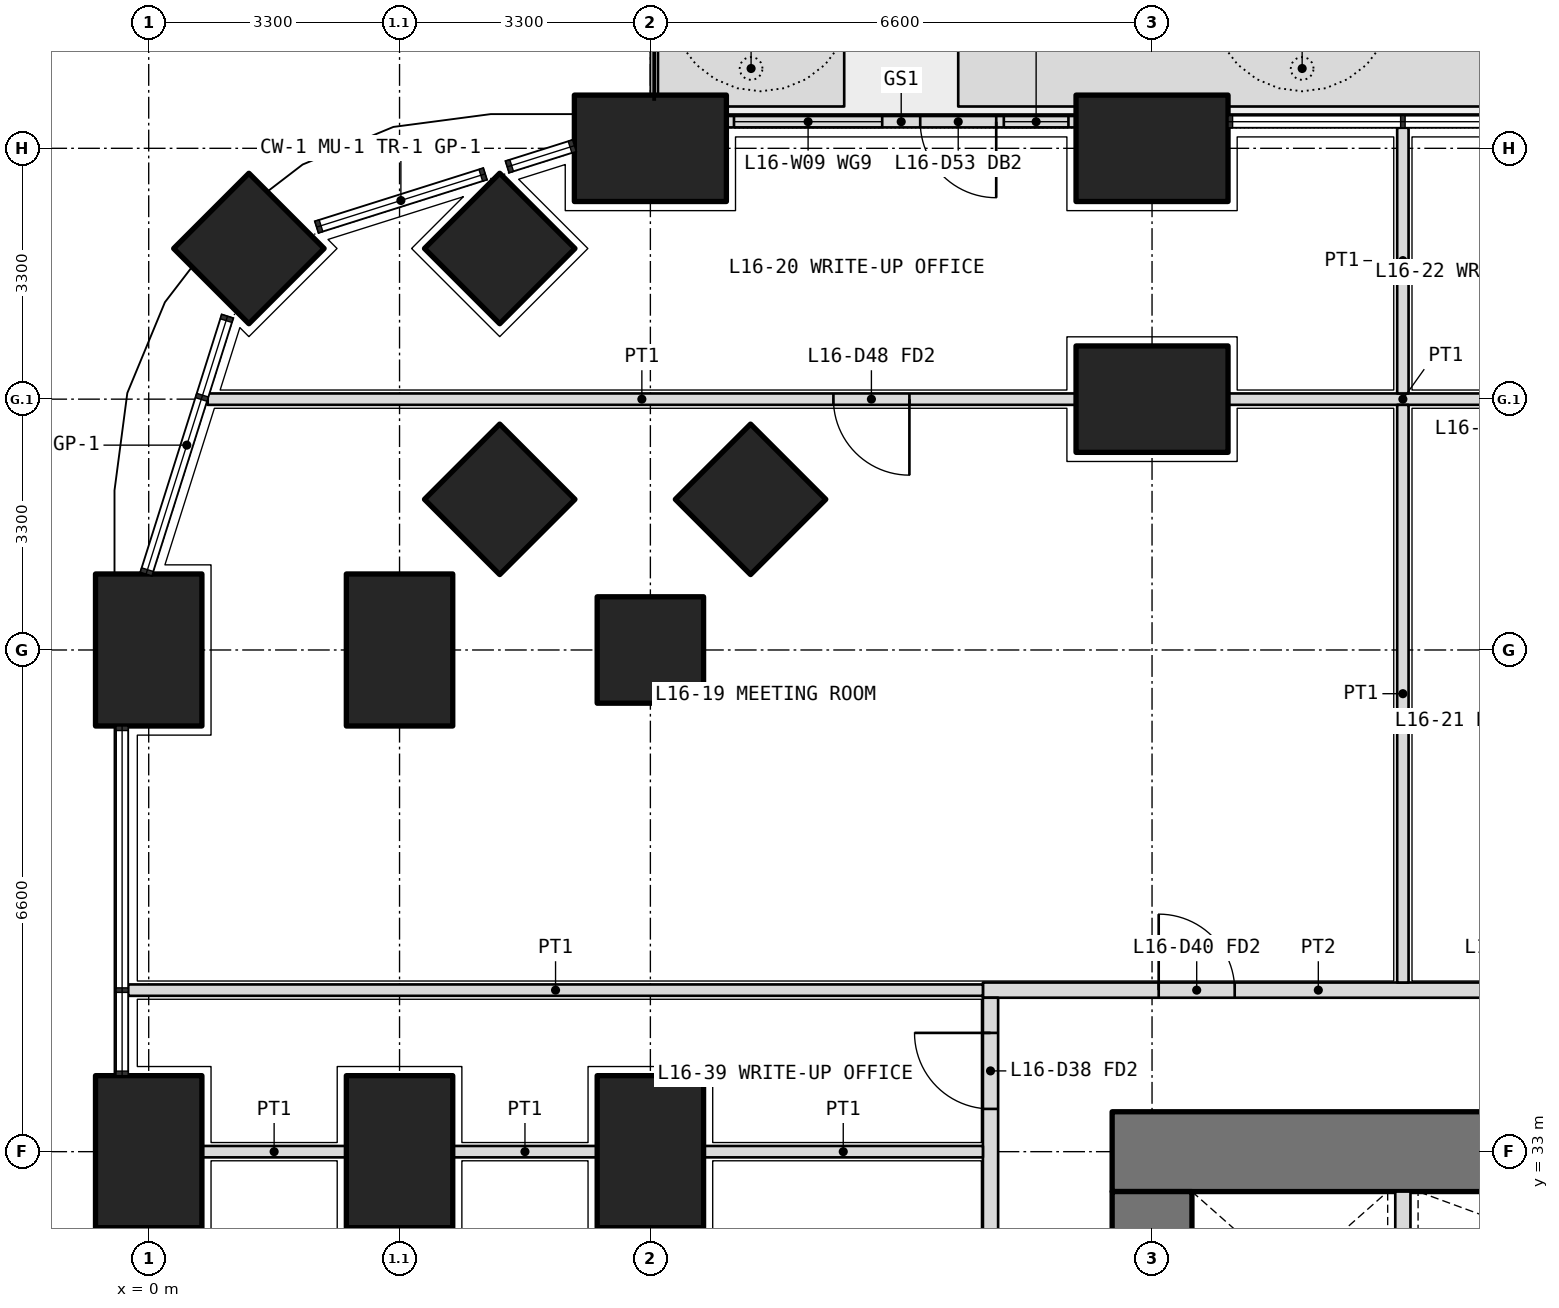
"""IFC4 building model, lengths in metres.
Left out: names, types, materials, properties, quantities, classifications, styles, units other than length and angle.
Written with IfcOpenShell. Run it as: python <this file> out.ifc"""

import sys

from ifc_helpers import new_model, si_unit, direction, frame, frame_2d, origin, origin_2d, place, context, subcontext, project, spatial, polyline, rectangle, outline, extrude, element, fill, save


model = new_model("IFC4")
c1 = context("Model", 3, precision=1e-05, world=origin(), true_north=direction((0.0, 1.0)))
c2 = subcontext(c1, "Body", "Model", "MODEL_VIEW")
j1 = project(units=[si_unit("LENGTHUNIT", "METRE"), si_unit("PLANEANGLEUNIT", "RADIAN")], contexts=[c1])
p1 = place(None, origin())
s1 = spatial("IfcSite", under=j1, at=p1, CompositionType="ELEMENT")
p2 = place(p1, origin())
s2 = spatial("IfcBuilding", under=s1, at=p2, CompositionType="ELEMENT")
p3 = place(p2, frame((0.0, 0.0, 71.7)))
s3 = spatial("IfcBuildingStorey", under=s2, at=p3, CompositionType="ELEMENT", Elevation=71.7)
p4 = place(p3, frame((1.318, 44.882, 0.0), z_axis=(0.0, 0.0, 1.0), x_axis=(0.707106781187, 0.707106781187, 0.0)))
e1 = element("IfcColumn", 1, at=p4, inside=s3, PredefinedType="COLUMN", context=c2, shape_type="SweptSolid", body=[
    extrude(rectangle(XDim=1.4, YDim=1.4, at=origin_2d()), origin(), (0.0, 0.0, 1.0), 4.2),
])
for number, where, z_axis, x_axis in (
    (2, (0.0, 33.0, 0.0), (0.0, 0.0, 1.0), (0.0, 1.0, 0.0)),
    (3, (0.0, 39.6, 0.0), (0.0, 0.0, 1.0), (0.0, 1.0, 0.0)),
    (4, (6.6, 46.2, 0.0), (0.0, 0.0, 1.0), (1.0, 0.0, 0.0)),
    (5, (13.2, 46.2, 0.0), (0.0, 0.0, 1.0), (1.0, 0.0, 0.0)),
):
    element("IfcColumn", number, at=place(p3, frame(where, z_axis=z_axis, x_axis=x_axis)), inside=s3, PredefinedType="COLUMN", context=c2, shape_type="SweptSolid", body=[
        extrude(rectangle(XDim=2.0, YDim=1.4, at=origin_2d()), origin(), (0.0, 0.0, 1.0), 4.2),
    ])
for number, where, z_axis, x_axis in (
    (6, (6.6, 39.6, 0.0), (0.0, 0.0, 1.0), (1.0, 0.0, 0.0)),
    (7, (4.618, 44.882, 0.0), (0.0, 0.0, 1.0), (0.707, 0.707, 0.0)),
):
    element("IfcColumn", number, at=place(p3, frame(where, z_axis=z_axis, x_axis=x_axis)), inside=s3, PredefinedType="COLUMN", context=c2, shape_type="SweptSolid", body=[
        extrude(rectangle(XDim=1.4, YDim=1.4, at=origin_2d()), origin(), (0.0, 0.0, 1.0), 4.2),
    ])
for number, where, z_axis, x_axis in (
    (8, (3.3, 33.0, 0.0), (0.0, 0.0, 1.0), (0.0, 1.0, 0.0)),
    (9, (3.3, 39.6, 0.0), (0.0, 0.0, 1.0), (0.0, 1.0, 0.0)),
):
    element("IfcColumn", number, at=place(p3, frame(where, z_axis=z_axis, x_axis=x_axis)), inside=s3, PredefinedType="COLUMN", context=c2, shape_type="SweptSolid", body=[
        extrude(rectangle(XDim=2.0, YDim=1.4, at=origin_2d()), origin(), (0.0, 0.0, 1.0), 4.2),
    ])
p5 = place(p3, frame((4.618, 41.582, 0.0), z_axis=(0.0, 0.0, 1.0), x_axis=(0.707106781187, 0.707106781187, 0.0)))
e10 = element("IfcColumn", 10, at=p5, inside=s3, PredefinedType="COLUMN", context=c2, shape_type="SweptSolid", body=[
    extrude(rectangle(XDim=1.4, YDim=1.4, at=origin_2d()), origin(), (0.0, 0.0, 1.0), 4.2),
])
p6 = place(p3, frame((13.2, 42.9, 0.0), z_axis=(0.0, 0.0, 1.0), x_axis=(1.0, 0.0, 0.0)))
e11 = element("IfcColumn", 11, at=p6, inside=s3, PredefinedType="COLUMN", context=c2, shape_type="SweptSolid", body=[
    extrude(rectangle(XDim=2.0, YDim=1.4, at=origin_2d()), origin(), (0.0, 0.0, 1.0), 4.2),
])
p7 = place(p3, frame((7.918, 41.582, 0.0), z_axis=(0.0, 0.0, 1.0), x_axis=(0.707106781187, 0.707106781187, 0.0)))
e12 = element("IfcColumn", 12, at=p7, inside=s3, PredefinedType="COLUMN", context=c2, shape_type="SweptSolid", body=[
    extrude(rectangle(XDim=1.4, YDim=1.4, at=origin_2d()), origin(), (0.0, 0.0, 1.0), 4.2),
])
p8 = place(p3, frame((6.6, 33.0, 0.0), z_axis=(0.0, 0.0, 1.0), x_axis=(0.0, 1.0, 0.0)))
e13 = element("IfcColumn", 13, at=p8, inside=s3, PredefinedType="COLUMN", context=c2, shape_type="SweptSolid", body=[
    extrude(rectangle(XDim=2.0, YDim=1.4, at=origin_2d()), origin(), (0.0, 0.0, 1.0), 4.2),
])
p9 = place(p3, origin())
e14 = element("IfcWall", 14, at=p9, inside=s3, PredefinedType="USERDEFINED", context=c2, shape_type="SweptSolid", body=[
    extrude(outline(polyline([(6.7, 46.75), (9.15, 46.75), (9.15, 47.75), (6.7, 47.75), (6.7, 46.75)]), holes=[polyline([(6.85, 46.9), (9.0, 46.9), (9.0, 47.6), (6.85, 47.6), (6.85, 46.9)])]), origin(), (0.0, 0.0, 1.0), 1.05),
])
p10 = place(p3, origin())
e15 = element("IfcWall", 15, at=p10, inside=s3, PredefinedType="USERDEFINED", context=c2, shape_type="SweptSolid", body=[
    extrude(outline(polyline([(10.65, 46.75), (19.7, 46.75), (19.7, 47.75), (10.65, 47.75), (10.65, 46.75)]), holes=[polyline([(10.8, 46.9), (19.55, 46.9), (19.55, 47.6), (10.8, 47.6), (10.8, 46.9)])]), origin(), (0.0, 0.0, 1.0), 1.05),
])
p11 = place(p3, frame((12.2, 46.55, 0.0), z_axis=(0.0, 0.0, 1.0), x_axis=(-1.0, 0.0, 0.0)))
e16 = element("IfcWall", 16, at=p11, inside=s3, PredefinedType="SOLIDWALL", context=c2, shape_type="SweptSolid", body=[
    extrude(rectangle(XDim=4.6, YDim=0.15, at=frame_2d((2.3, 0.0))), origin(), (0.0, 0.0, 1.0), 2.05),
])
p12 = place(p11, frame((1.05, 0.0, 0.0)))
e17 = element("IfcOpeningElement", 17, at=p12, cuts=e16, PredefinedType="OPENING", context=c2, shape_type="SweptSolid", body=[
    extrude(rectangle(XDim=1.0, YDim=2.0, at=frame_2d((0.5, 1.0))), frame((0.0, 0.085, 0.0), z_axis=(0.0, -1.0, 0.0), x_axis=(1.0, 0.0, 0.0)), (0.0, 0.0, 1.0), 0.17),
])
p13 = place(p11, frame((0.1, 0.0, 0.1)))
e18 = element("IfcOpeningElement", 18, at=p13, cuts=e16, PredefinedType="OPENING", context=c2, shape_type="SweptSolid", body=[
    extrude(rectangle(XDim=0.85, YDim=1.65, at=frame_2d((0.425, 0.825))), frame((0.0, 0.085, 0.0), z_axis=(0.0, -1.0, 0.0), x_axis=(1.0, 0.0, 0.0)), (0.0, 0.0, 1.0), 0.17),
])
p14 = place(p11, frame((2.55, 0.0, 0.1)))
e19 = element("IfcOpeningElement", 19, at=p14, cuts=e16, PredefinedType="OPENING", context=c2, shape_type="SweptSolid", body=[
    extrude(rectangle(XDim=1.95, YDim=1.65, at=frame_2d((0.975, 0.825))), frame((0.0, 0.085, 0.0), z_axis=(0.0, -1.0, 0.0), x_axis=(1.0, 0.0, 0.0)), (0.0, 0.0, 1.0), 0.17),
])
p15 = place(p3, frame((40.125, 33.0, 0.0), z_axis=(0.0, 0.0, 1.0), x_axis=(-1.0, 0.0, 0.0)))
e20 = element("IfcWall", 20, at=p15, inside=s3, PredefinedType="SHEAR", context=c2, shape_type="SweptSolid", body=[
    extrude(rectangle(XDim=27.45, YDim=1.05, at=frame_2d((13.725, 0.0))), origin(), (0.0, 0.0, 1.0), 4.2),
])
p16 = place(p3, frame((13.2, 32.475, 0.0), z_axis=(0.0, 0.0, 1.0), x_axis=(0.0, -1.0, 0.0)))
e21 = element("IfcWall", 21, at=p16, inside=s3, PredefinedType="SHEAR", context=c2, shape_type="SweptSolid", body=[
    extrude(rectangle(XDim=18.75, YDim=1.05, at=frame_2d((9.375, 0.0))), origin(), (0.0, 0.0, 1.0), 4.2),
])
p17 = place(p16, frame((14.125, 0.0, 0.0)))
e22 = element("IfcOpeningElement", 22, at=p17, cuts=e21, PredefinedType="OPENING", context=c2, shape_type="SweptSolid", body=[
    extrude(rectangle(XDim=1.6, YDim=2.1, at=frame_2d((0.8, 1.05))), frame((0.0, 0.535, 0.0), z_axis=(0.0, -1.0, 0.0), x_axis=(1.0, 0.0, 0.0)), (0.0, 0.0, 1.0), 1.07),
])
p18 = place(p16, frame((3.325, 0.0, 0.0)))
e23 = element("IfcOpeningElement", 23, at=p18, cuts=e21, PredefinedType="OPENING", context=c2, shape_type="SweptSolid", body=[
    extrude(rectangle(XDim=1.6, YDim=2.1, at=frame_2d((0.8, 1.05))), frame((0.0, 0.535, 0.0), z_axis=(0.0, -1.0, 0.0), x_axis=(1.0, 0.0, 0.0)), (0.0, 0.0, 1.0), 1.07),
])
p19 = place(p3, frame((16.5, 30.2, 0.0), z_axis=(0.0, 0.0, 1.0), x_axis=(0.0, 1.0, 0.0)))
e24 = element("IfcWall", 24, at=p19, inside=s3, PredefinedType="PARTITIONING", context=c2, shape_type="SweptSolid", body=[
    extrude(rectangle(XDim=2.275, YDim=0.2, at=frame_2d((1.138, 0.0))), origin(), (0.0, 0.0, 1.0), 4.2),
])
p20 = place(p3, frame((10.975, 35.125, 0.0), z_axis=(0.0, 0.0, 1.0), x_axis=(1.0, 0.0, 0.0)))
e25 = element("IfcWall", 25, at=p20, inside=s3, PredefinedType="PARTITIONING", context=c2, shape_type="SweptSolid", body=[
    extrude(rectangle(XDim=8.825, YDim=0.2, at=frame_2d((4.413, 0.0))), origin(), (0.0, 0.0, 1.0), 2.55),
])
p21 = place(p20, frame((2.312, 0.0, 0.0)))
e26 = element("IfcOpeningElement", 26, at=p21, cuts=e25, PredefinedType="OPENING", context=c2, shape_type="SweptSolid", body=[
    extrude(rectangle(XDim=1.0, YDim=2.1, at=frame_2d((0.5, 1.05))), frame((0.0, 0.11, 0.0), z_axis=(0.0, -1.0, 0.0), x_axis=(1.0, 0.0, 0.0)), (0.0, 0.0, 1.0), 0.22),
])
p22 = place(p20, frame((6.675, 0.0, 0.0)))
e27 = element("IfcOpeningElement", 27, at=p22, cuts=e25, PredefinedType="OPENING", context=c2, shape_type="SweptSolid", body=[
    extrude(rectangle(XDim=1.0, YDim=2.1, at=frame_2d((0.5, 1.05))), frame((0.0, 0.11, 0.0), z_axis=(0.0, -1.0, 0.0), x_axis=(1.0, 0.0, 0.0)), (0.0, 0.0, 1.0), 0.22),
])
p23 = place(p3, frame((11.075, 11.175, 0.0), z_axis=(0.0, 0.0, 1.0), x_axis=(0.0, 1.0, 0.0)))
e28 = element("IfcWall", 28, at=p23, inside=s3, PredefinedType="PARTITIONING", context=c2, shape_type="SweptSolid", body=[
    extrude(rectangle(XDim=23.85, YDim=0.2, at=frame_2d((11.925, 0.0))), origin(), (0.0, 0.0, 1.0), 2.55),
])
p24 = place(p23, frame((0.462, 0.0, 0.0)))
e29 = element("IfcOpeningElement", 29, at=p24, cuts=e28, PredefinedType="OPENING", context=c2, shape_type="SweptSolid", body=[
    extrude(rectangle(XDim=1.0, YDim=2.1, at=frame_2d((0.5, 1.05))), frame((0.0, 0.11, 0.0), z_axis=(0.0, -1.0, 0.0), x_axis=(1.0, 0.0, 0.0)), (0.0, 0.0, 1.0), 0.22),
])
p25 = place(p23, frame((2.575, 0.0, 0.0)))
e30 = element("IfcOpeningElement", 30, at=p25, cuts=e28, PredefinedType="OPENING", context=c2, shape_type="SweptSolid", body=[
    extrude(rectangle(XDim=1.0, YDim=2.1, at=frame_2d((0.5, 1.05))), frame((0.0, 0.11, 0.0), z_axis=(0.0, -1.0, 0.0), x_axis=(1.0, 0.0, 0.0)), (0.0, 0.0, 1.0), 0.22),
])
p26 = place(p23, frame((5.625, 0.0, 0.0)))
e31 = element("IfcOpeningElement", 31, at=p26, cuts=e28, PredefinedType="OPENING", context=c2, shape_type="SweptSolid", body=[
    extrude(rectangle(XDim=0.9, YDim=2.1, at=frame_2d((0.45, 1.05))), frame((0.0, 0.11, 0.0), z_axis=(0.0, -1.0, 0.0), x_axis=(1.0, 0.0, 0.0)), (0.0, 0.0, 1.0), 0.22),
])
p27 = place(p23, frame((9.425, 0.0, 0.0)))
e32 = element("IfcOpeningElement", 32, at=p27, cuts=e28, PredefinedType="OPENING", context=c2, shape_type="SweptSolid", body=[
    extrude(rectangle(XDim=0.9, YDim=2.1, at=frame_2d((0.45, 1.05))), frame((0.0, 0.11, 0.0), z_axis=(0.0, -1.0, 0.0), x_axis=(1.0, 0.0, 0.0)), (0.0, 0.0, 1.0), 0.22),
])
p28 = place(p23, frame((12.975, 0.0, 0.0)))
e33 = element("IfcOpeningElement", 33, at=p28, cuts=e28, PredefinedType="OPENING", context=c2, shape_type="SweptSolid", body=[
    extrude(rectangle(XDim=1.0, YDim=2.1, at=frame_2d((0.5, 1.05))), frame((0.0, 0.11, 0.0), z_axis=(0.0, -1.0, 0.0), x_axis=(1.0, 0.0, 0.0)), (0.0, 0.0, 1.0), 0.22),
])
p29 = place(p23, frame((18.025, 0.0, 0.0)))
e34 = element("IfcOpeningElement", 34, at=p29, cuts=e28, PredefinedType="OPENING", context=c2, shape_type="SweptSolid", body=[
    extrude(rectangle(XDim=1.0, YDim=2.1, at=frame_2d((0.5, 1.05))), frame((0.0, 0.11, 0.0), z_axis=(0.0, -1.0, 0.0), x_axis=(1.0, 0.0, 0.0)), (0.0, 0.0, 1.0), 0.22),
])
p30 = place(p23, frame((22.387, 0.0, 0.0)))
e35 = element("IfcOpeningElement", 35, at=p30, cuts=e28, PredefinedType="OPENING", context=c2, shape_type="SweptSolid", body=[
    extrude(rectangle(XDim=1.0, YDim=2.1, at=frame_2d((0.5, 1.05))), frame((0.0, 0.11, 0.0), z_axis=(0.0, -1.0, 0.0), x_axis=(1.0, 0.0, 0.0)), (0.0, 0.0, 1.0), 0.22),
])
p31 = place(p3, frame((-0.27, 35.125, 0.0), z_axis=(0.0, 0.0, 1.0), x_axis=(1.0, 0.0, 0.0)))
e36 = element("IfcWall", 36, at=p31, inside=s3, PredefinedType="PARTITIONING", context=c2, shape_type="SweptSolid", body=[
    extrude(rectangle(XDim=11.245, YDim=0.15, at=frame_2d((5.623, 0.0))), origin(), (0.0, 0.0, 1.0), 3.85),
])
p32 = place(p3, frame((18.8, 42.9, 0.0), z_axis=(0.0, 0.0, 1.0), x_axis=(-1.0, 0.0, 0.0)))
e37 = element("IfcWall", 37, at=p32, inside=s3, PredefinedType="PARTITIONING", context=c2, shape_type="SweptSolid", body=[
    extrude(rectangle(XDim=4.6, YDim=0.15, at=frame_2d((2.3, 0.0))), origin(), (0.0, 0.0, 1.0), 2.55),
])
p33 = place(p32, frame((0.15, 0.0, 0.0)))
e38 = element("IfcOpeningElement", 38, at=p33, cuts=e37, PredefinedType="OPENING", context=c2, shape_type="SweptSolid", body=[
    extrude(rectangle(XDim=1.0, YDim=2.1, at=frame_2d((0.5, 1.05))), frame((0.0, 0.085, 0.0), z_axis=(0.0, -1.0, 0.0), x_axis=(1.0, 0.0, 0.0)), (0.0, 0.0, 1.0), 0.17),
])
p34 = place(p3, frame((12.2, 42.9, 0.0), z_axis=(0.0, 0.0, 1.0), x_axis=(-1.0, 0.0, 0.0)))
e39 = element("IfcWall", 39, at=p34, inside=s3, PredefinedType="PARTITIONING", context=c2, shape_type="SweptSolid", body=[
    extrude(rectangle(XDim=11.424, YDim=0.15, at=frame_2d((5.712, 0.0))), origin(), (0.0, 0.0, 1.0), 3.85),
])
p35 = place(p34, frame((2.192, 0.0, 0.0)))
e40 = element("IfcOpeningElement", 40, at=p35, cuts=e39, PredefinedType="OPENING", context=c2, shape_type="SweptSolid", body=[
    extrude(rectangle(XDim=1.0, YDim=2.1, at=frame_2d((0.5, 1.05))), frame((0.0, 0.085, 0.0), z_axis=(0.0, -1.0, 0.0), x_axis=(1.0, 0.0, 0.0)), (0.0, 0.0, 1.0), 0.17),
])
p36 = place(p3, frame((16.5, 46.47, 0.0), z_axis=(0.0, 0.0, 1.0), x_axis=(0.0, -1.0, 0.0)))
e41 = element("IfcWall", 41, at=p36, inside=s3, PredefinedType="PARTITIONING", context=c2, shape_type="SweptSolid", body=[
    extrude(rectangle(XDim=3.495, YDim=0.15, at=frame_2d((1.748, 0.0))), origin(), (0.0, 0.0, 1.0), 3.85),
])
p37 = place(p3, frame((16.5, 42.825, 0.0), z_axis=(0.0, 0.0, 1.0), x_axis=(0.0, -1.0, 0.0)))
e42 = element("IfcWall", 42, at=p37, inside=s3, PredefinedType="PARTITIONING", context=c2, shape_type="SweptSolid", body=[
    extrude(rectangle(XDim=7.6, YDim=0.15, at=frame_2d((3.8, 0.0))), origin(), (0.0, 0.0, 1.0), 3.85),
])
p38 = place(p3, frame((0.7, 33.0, 0.0), z_axis=(0.0, 0.0, 1.0), x_axis=(1.0, 0.0, 0.0)))
e43 = element("IfcWall", 43, at=p38, inside=s3, PredefinedType="PARTITIONING", context=c2, shape_type="SweptSolid", body=[
    extrude(rectangle(XDim=1.9, YDim=0.15, at=frame_2d((0.95, 0.0))), origin(), (0.0, 0.0, 1.0), 2.55),
])
p39 = place(p3, frame((4.0, 33.0, 0.0), z_axis=(0.0, 0.0, 1.0), x_axis=(1.0, 0.0, 0.0)))
e44 = element("IfcWall", 44, at=p39, inside=s3, PredefinedType="PARTITIONING", context=c2, shape_type="SweptSolid", body=[
    extrude(rectangle(XDim=1.9, YDim=0.15, at=frame_2d((0.95, 0.0))), origin(), (0.0, 0.0, 1.0), 2.55),
])
p40 = place(p3, frame((7.3, 33.0, 0.0), z_axis=(0.0, 0.0, 1.0), x_axis=(1.0, 0.0, 0.0)))
e45 = element("IfcWall", 45, at=p40, inside=s3, PredefinedType="PARTITIONING", context=c2, shape_type="SweptSolid", body=[
    extrude(rectangle(XDim=3.675, YDim=0.15, at=frame_2d((1.837, 0.0))), origin(), (0.0, 0.0, 1.0), 2.55),
])
p41 = place(p12, origin())
e46 = element("IfcDoor", 46, at=p41, inside=s3, OperationType="SINGLE_SWING_LEFT", PredefinedType="DOOR", context=c2, shape_type="SweptSolid", body=[
    extrude(rectangle(XDim=1.0, YDim=2.0, at=frame_2d((0.5, 1.0))), frame((0.0, 0.025, 0.0), z_axis=(0.0, -1.0, 0.0), x_axis=(1.0, 0.0, 0.0)), (0.0, 0.0, 1.0), 0.05),
])
fill(e17, e46)
p42 = place(p13, origin())
e47 = element("IfcWindow", 47, at=p42, inside=s3, PartitioningType="SINGLE_PANEL", PredefinedType="WINDOW", context=c2, shape_type="SweptSolid", body=[
    extrude(rectangle(XDim=0.85, YDim=1.65, at=frame_2d((0.425, 0.825))), frame((0.0, 0.03, 0.0), z_axis=(0.0, -1.0, 0.0), x_axis=(1.0, 0.0, 0.0)), (0.0, 0.0, 1.0), 0.06),
])
fill(e18, e47)
p43 = place(p14, origin())
e48 = element("IfcWindow", 48, at=p43, inside=s3, PartitioningType="SINGLE_PANEL", PredefinedType="WINDOW", context=c2, shape_type="SweptSolid", body=[
    extrude(rectangle(XDim=1.95, YDim=1.65, at=frame_2d((0.975, 0.825))), frame((0.0, 0.03, 0.0), z_axis=(0.0, -1.0, 0.0), x_axis=(1.0, 0.0, 0.0)), (0.0, 0.0, 1.0), 0.06),
])
fill(e19, e48)
p44 = place(p21, origin())
e49 = element("IfcDoor", 49, at=p44, inside=s3, OperationType="SINGLE_SWING_LEFT", PredefinedType="DOOR", context=c2, shape_type="SweptSolid", body=[
    extrude(rectangle(XDim=1.0, YDim=2.1, at=frame_2d((0.5, 1.05))), frame((0.0, 0.025, 0.0), z_axis=(0.0, -1.0, 0.0), x_axis=(1.0, 0.0, 0.0)), (0.0, 0.0, 1.0), 0.05),
])
fill(e26, e49)
p45 = place(p35, origin())
e50 = element("IfcDoor", 50, at=p45, inside=s3, OperationType="SINGLE_SWING_LEFT", PredefinedType="DOOR", context=c2, shape_type="SweptSolid", body=[
    extrude(rectangle(XDim=1.0, YDim=2.1, at=frame_2d((0.5, 1.05))), frame((0.0, 0.025, 0.0), z_axis=(0.0, -1.0, 0.0), x_axis=(1.0, 0.0, 0.0)), (0.0, 0.0, 1.0), 0.05),
])
fill(e40, e50)
p46 = place(p30, origin())
e51 = element("IfcDoor", 51, at=p46, inside=s3, OperationType="SINGLE_SWING_RIGHT", PredefinedType="DOOR", context=c2, shape_type="SweptSolid", body=[
    extrude(rectangle(XDim=1.0, YDim=2.1, at=frame_2d((0.5, 1.05))), frame((0.0, 0.025, 0.0), z_axis=(0.0, -1.0, 0.0), x_axis=(1.0, 0.0, 0.0)), (0.0, 0.0, 1.0), 0.05),
])
fill(e35, e51)
save(model, sys.argv[1])
